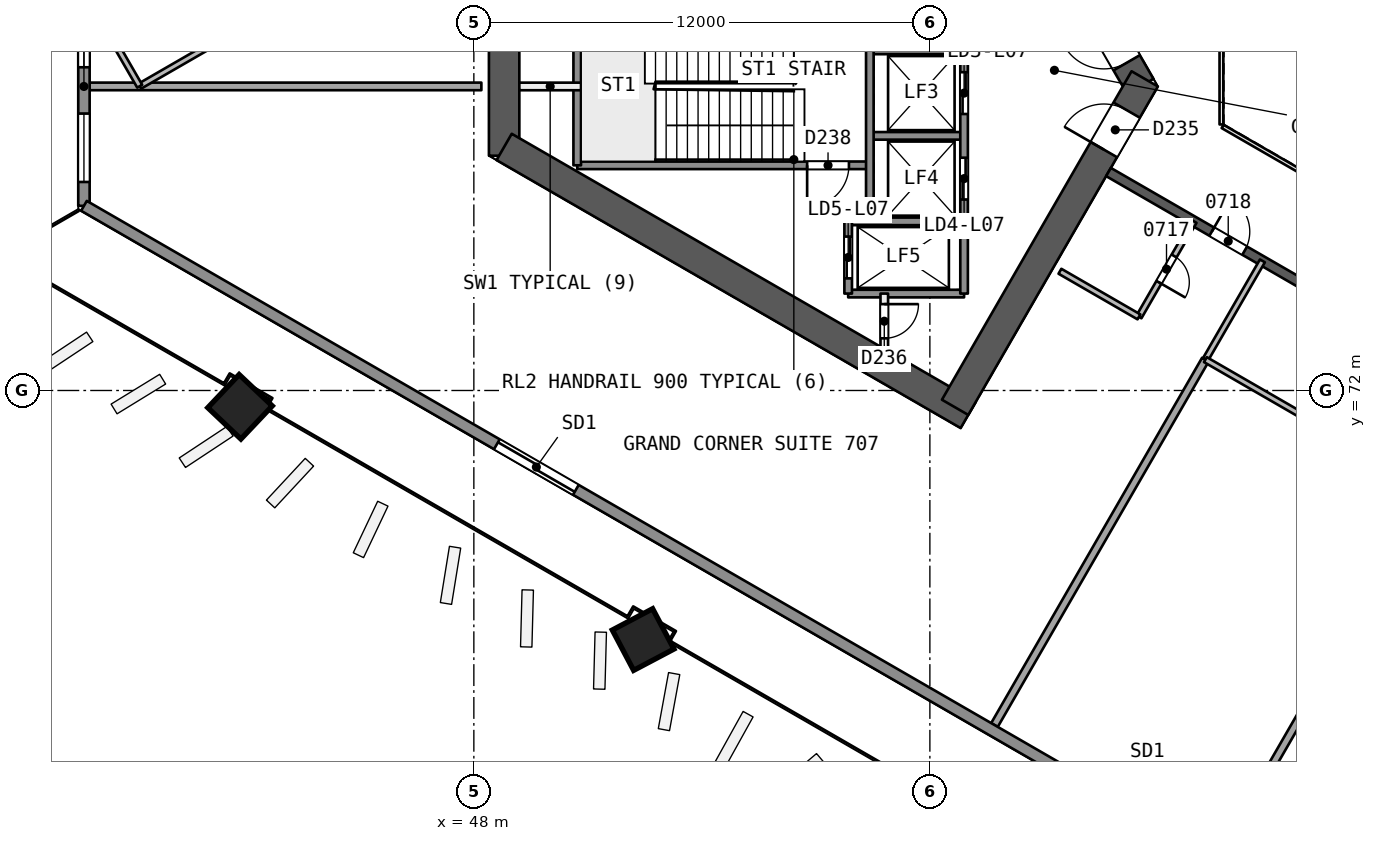
"""IFC4 building model, lengths in metres.
Left out: names, types, materials, properties, quantities, classifications, styles, units other than length and angle.
Written with IfcOpenShell. Run it as: python <this file> out.ifc"""

import sys

from ifc_helpers import new_model, si_unit, direction, frame, frame_2d, origin, origin_2d, place, context, subcontext, project, spatial, rectangle, extrude, element, fill, save


model = new_model("IFC4")
c1 = context("Model", 3, precision=1e-05, world=origin(), true_north=direction((0.0, 1.0)))
c2 = subcontext(c1, "Body", "Model", "MODEL_VIEW")
j1 = project(units=[si_unit("LENGTHUNIT", "METRE"), si_unit("PLANEANGLEUNIT", "RADIAN")], contexts=[c1])
p1 = place(None, origin())
s1 = spatial("IfcSite", under=j1, at=p1, CompositionType="ELEMENT")
p2 = place(p1, origin())
s2 = spatial("IfcBuilding", under=s1, at=p2, CompositionType="ELEMENT")
p3 = place(p2, frame((0.0, 0.0, 37.4)))
s3 = spatial("IfcBuildingStorey", under=s2, at=p3, CompositionType="ELEMENT", Elevation=37.4)
p4 = place(p3, frame((65.538, 80.0, 0.0), z_axis=(0.0, 0.0, 1.0), x_axis=(-0.49999662545, 0.866027352073, 0.0)))
e1 = element("IfcWall", 1, at=p4, inside=s3, PredefinedType="SHEAR", context=c2, shape_type="SweptSolid", body=[
    extrude(rectangle(XDim=10.149, YDim=0.8, at=frame_2d((5.074, 0.0))), origin(), (0.0, 0.0, 1.0), 3.7),
])
p5 = place(p4, frame((0.719, 0.0, 0.0)))
e2 = element("IfcOpeningElement", 2, at=p5, cuts=e1, PredefinedType="OPENING", context=c2, shape_type="SweptSolid", body=[
    extrude(rectangle(XDim=1.2, YDim=2.1, at=frame_2d((0.6, 1.05))), frame((0.0, 0.411, 0.0), z_axis=(0.0, -1.0, 0.0), x_axis=(1.0, 0.0, 0.0)), (0.0, 0.0, 1.0), 0.821),
])
p6 = place(p3, frame((48.797, 81.592, 0.0), z_axis=(0.0, 0.0, 1.0), x_axis=(0.0, -1.0, 0.0)))
e3 = element("IfcWall", 3, at=p6, inside=s3, PredefinedType="SHEAR", context=c2, shape_type="SweptSolid", body=[
    extrude(rectangle(XDim=3.415, YDim=0.8, at=frame_2d((1.707, 0.0))), origin(), (0.0, 0.0, 1.0), 3.7),
])
p7 = place(p3, frame((48.797, 78.408, 0.0), z_axis=(0.0, 0.0, 1.0), x_axis=(0.866032504327, -0.499987701298, 0.0)))
e4 = element("IfcWall", 4, at=p7, inside=s3, PredefinedType="SHEAR", context=c2, shape_type="SweptSolid", body=[
    extrude(rectangle(XDim=14.102, YDim=0.8, at=frame_2d((7.051, 0.0))), origin(), (0.0, 0.0, 1.0), 3.7),
])
p8 = place(p3, frame((60.664, 71.557, 0.0), z_axis=(0.0, 0.0, 1.0), x_axis=(0.50000409368, 0.866023040284, 0.0)))
e5 = element("IfcWall", 5, at=p8, inside=s3, PredefinedType="SHEAR", context=c2, shape_type="SweptSolid", body=[
    extrude(rectangle(XDim=9.98, YDim=0.8, at=frame_2d((4.99, 0.0))), origin(), (0.0, 0.0, 1.0), 3.7),
])
p9 = place(p8, frame((7.83, 0.0, 0.0)))
e6 = element("IfcOpeningElement", 6, at=p9, cuts=e5, PredefinedType="OPENING", context=c2, shape_type="SweptSolid", body=[
    extrude(rectangle(XDim=1.2, YDim=2.1, at=frame_2d((0.6, 1.05))), frame((0.0, 0.411, 0.0), z_axis=(0.0, -1.0, 0.0), x_axis=(1.0, 0.0, 0.0)), (0.0, 0.0, 1.0), 0.821),
])
p10 = place(p3, frame((64.7, 77.748, 0.0), z_axis=(0.0, 0.0, 1.0), x_axis=(0.866026492143, -0.499998114903, 0.0)))
e7 = element("IfcWall", 7, at=p10, inside=s3, PredefinedType="SHEAR", context=c2, shape_type="SweptSolid", body=[
    extrude(rectangle(XDim=15.588, YDim=0.25, at=frame_2d((7.794, 0.0))), origin(), (0.0, 0.0, 1.0), 3.2),
])
p11 = place(p10, frame((3.138, 0.0, 0.0)))
e8 = element("IfcOpeningElement", 8, at=p11, cuts=e7, PredefinedType="OPENING", context=c2, shape_type="SweptSolid", body=[
    extrude(rectangle(XDim=1.0, YDim=2.1, at=frame_2d((0.5, 1.05))), frame((0.0, 0.135, 0.0), z_axis=(0.0, -1.0, 0.0), x_axis=(1.0, 0.0, 0.0)), (0.0, 0.0, 1.0), 0.271),
])
p12 = place(p10, frame((9.006, 0.0, 0.0)))
e9 = element("IfcOpeningElement", 9, at=p12, cuts=e7, PredefinedType="OPENING", context=c2, shape_type="SweptSolid", body=[
    extrude(rectangle(XDim=1.1, YDim=2.1, at=frame_2d((0.55, 1.05))), frame((0.0, 0.135, 0.0), z_axis=(0.0, -1.0, 0.0), x_axis=(1.0, 0.0, 0.0)), (0.0, 0.0, 1.0), 0.271),
])
p13 = place(p10, frame((11.762, 0.0, 0.0)))
e10 = element("IfcOpeningElement", 10, at=p13, cuts=e7, PredefinedType="OPENING", context=c2, shape_type="SweptSolid", body=[
    extrude(rectangle(XDim=1.0, YDim=2.1, at=frame_2d((0.5, 1.05))), frame((0.0, 0.135, 0.0), z_axis=(0.0, -1.0, 0.0), x_axis=(1.0, 0.0, 0.0)), (0.0, 0.0, 1.0), 0.271),
])
p14 = place(p3, frame((41.813, 71.562, 0.0), z_axis=(0.028557219273, 0.006859008786, 0.999568626571), x_axis=(-0.86641042505, 0.498876758723, 0.021329673472)))
e11 = element("IfcColumn", 11, at=p14, inside=s3, PredefinedType="COLUMN", context=c2, shape_type="SweptSolid", body=[
    extrude(rectangle(XDim=1.2, YDim=1.2, at=origin_2d()), origin(), (0.0, 0.0, 1.0), 3.702),
])
p15 = place(p3, frame((52.431, 65.432, 0.0), z_axis=(0.019327242333, 0.012137244332, 0.999739538582), x_axis=(-0.865690923328, 0.500465374709, 0.010659924227)))
e12 = element("IfcColumn", 12, at=p15, inside=s3, PredefinedType="COLUMN", context=c2, shape_type="SweptSolid", body=[
    extrude(rectangle(XDim=1.2, YDim=1.2, at=origin_2d()), origin(), (0.0, 0.0, 1.0), 3.701),
])
p16 = place(p3, frame((41.459, 81.306, 0.0), z_axis=(0.0, 0.0, 1.0), x_axis=(-0.866021400173, -0.500006934395, 0.0)))
e13 = element("IfcWall", 13, at=p16, inside=s3, PredefinedType="PARTITIONING", context=c2, shape_type="SweptSolid", body=[
    extrude(rectangle(XDim=2.6, YDim=0.15, at=frame_2d((1.3, 0.0))), origin(), (0.0, 0.0, 1.0), 3.2),
])
p17 = place(p3, frame((39.208, 80.006, 0.0), z_axis=(0.0, 0.0, 1.0), x_axis=(-0.499992239852, 0.866029884062, 0.0)))
e14 = element("IfcWall", 14, at=p17, inside=s3, PredefinedType="PARTITIONING", context=c2, shape_type="SweptSolid", body=[
    extrude(rectangle(XDim=2.637, YDim=0.15, at=frame_2d((1.319, 0.0))), origin(), (0.0, 0.0, 1.0), 3.2),
])
p18 = place(p3, frame((37.889, 80.001, 0.0), z_axis=(0.0, 0.0, 1.0), x_axis=(1.0, 0.0, 0.0)))
e15 = element("IfcWall", 15, at=p18, inside=s3, PredefinedType="PARTITIONING", context=c2, shape_type="SweptSolid", body=[
    extrude(rectangle(XDim=10.309, YDim=0.2, at=frame_2d((5.155, 0.0))), origin(), (0.0, 0.0, 1.0), 3.2),
])
p19 = place(p3, frame((66.952, 76.448, 0.0), z_axis=(0.0, 0.0, 1.0), x_axis=(-0.499987231761, -0.866032775405, 0.0)))
e16 = element("IfcWall", 16, at=p19, inside=s3, PredefinedType="PARTITIONING", context=c2, shape_type="SweptSolid", body=[
    extrude(rectangle(XDim=2.9, YDim=0.15, at=frame_2d((1.45, 0.0))), origin(), (0.0, 0.0, 1.0), 3.2),
])
p20 = place(p19, frame((1.05, 0.0, 0.0)))
e17 = element("IfcOpeningElement", 17, at=p20, cuts=e16, PredefinedType="OPENING", context=c2, shape_type="SweptSolid", body=[
    extrude(rectangle(XDim=0.8, YDim=2.1, at=frame_2d((0.4, 1.05))), frame((0.0, 0.085, 0.0), z_axis=(0.0, -1.0, 0.0), x_axis=(1.0, 0.0, 0.0)), (0.0, 0.0, 1.0), 0.171),
])
p21 = place(p3, frame((65.502, 73.937, 0.0), z_axis=(0.0, 0.0, 1.0), x_axis=(-0.865994240961, 0.500053971709, 0.0)))
e18 = element("IfcWall", 18, at=p21, inside=s3, PredefinedType="PARTITIONING", context=c2, shape_type="SweptSolid", body=[
    extrude(rectangle(XDim=2.401, YDim=0.15, at=frame_2d((1.201, 0.0))), origin(), (0.0, 0.0, 1.0), 3.2),
])
p22 = place(p3, frame((61.699, 63.198, 0.0), z_axis=(0.0, 0.0, 1.0), x_axis=(0.499999115929, 0.866025914202, 0.0)))
e19 = element("IfcWall", 19, at=p22, inside=s3, PredefinedType="PARTITIONING", context=c2, shape_type="SweptSolid", body=[
    extrude(rectangle(XDim=11.102, YDim=0.2, at=frame_2d((5.551, 0.0))), origin(), (0.0, 0.0, 1.0), 3.2),
])
p23 = place(p3, frame((67.25, 72.812, 0.0), z_axis=(0.0, 0.0, 1.0), x_axis=(0.499990139034, 0.866031096941, 0.0)))
e20 = element("IfcWall", 20, at=p23, inside=s3, PredefinedType="PARTITIONING", context=c2, shape_type="SweptSolid", body=[
    extrude(rectangle(XDim=3.0, YDim=0.15, at=frame_2d((1.5, 0.0))), origin(), (0.0, 0.0, 1.0), 3.2),
])
p24 = place(p3, frame((69.761, 71.362, 0.0), z_axis=(0.0, 0.0, 1.0), x_axis=(-0.866032775405, 0.499987231761, 0.0)))
e21 = element("IfcWall", 21, at=p24, inside=s3, PredefinedType="PARTITIONING", context=c2, shape_type="SweptSolid", body=[
    extrude(rectangle(XDim=2.9, YDim=0.15, at=frame_2d((1.45, 0.0))), origin(), (0.0, 0.0, 1.0), 3.2),
])
p25 = place(p3, frame((67.639, 59.768, 0.0), z_axis=(0.0, 0.0, 1.0), x_axis=(0.499997206141, 0.866027016814, 0.0)))
e22 = element("IfcWall", 22, at=p25, inside=s3, PredefinedType="PARTITIONING", context=c2, shape_type="SweptSolid", body=[
    extrude(rectangle(XDim=14.102, YDim=0.2, at=frame_2d((7.051, 0.0))), origin(), (0.0, 0.0, 1.0), 3.2),
])
p26 = place(p3, frame((37.74, 76.859, 0.0), z_axis=(0.0, 0.0, 1.0), x_axis=(0.0, 1.0, 0.0)))
e23 = element("IfcWall", 23, at=p26, inside=s3, PredefinedType="SOLIDWALL", context=c2, shape_type="SweptSolid", body=[
    extrude(rectangle(XDim=6.283, YDim=0.3, at=frame_2d((3.141, 0.0))), origin(), (0.0, 0.0, 1.0), 3.2),
])
p27 = place(p26, frame((3.646, 0.0, 0.9)))
e24 = element("IfcOpeningElement", 24, at=p27, cuts=e23, PredefinedType="OPENING", context=c2, shape_type="SweptSolid", body=[
    extrude(rectangle(XDim=1.8, YDim=1.5, at=frame_2d((0.9, 0.75))), frame((0.0, 0.161, 0.0), z_axis=(0.0, -1.0, 0.0), x_axis=(1.0, 0.0, 0.0)), (0.0, 0.0, 1.0), 0.321),
])
p28 = place(p26, frame((0.628, 0.0, 0.9)))
e25 = element("IfcOpeningElement", 25, at=p28, cuts=e23, PredefinedType="OPENING", context=c2, shape_type="SweptSolid", body=[
    extrude(rectangle(XDim=1.8, YDim=1.5, at=frame_2d((0.9, 0.75))), frame((0.0, 0.161, 0.0), z_axis=(0.0, -1.0, 0.0), x_axis=(1.0, 0.0, 0.0)), (0.0, 0.0, 1.0), 0.321),
])
p29 = place(p3, frame((90.91, 46.161, 0.0), z_axis=(0.0, 0.0, 1.0), x_axis=(-0.866026524777, 0.499998058379, 0.0)))
e26 = element("IfcWall", 26, at=p29, inside=s3, PredefinedType="SOLIDWALL", context=c2, shape_type="SweptSolid", body=[
    extrude(rectangle(XDim=61.395, YDim=0.3, at=frame_2d((30.698, 0.0))), origin(), (0.0, 0.0, 1.0), 3.2),
])
p30 = place(p29, frame((29.186, 0.0, 0.0)))
e27 = element("IfcOpeningElement", 27, at=p30, cuts=e26, PredefinedType="OPENING", context=c2, shape_type="SweptSolid", body=[
    extrude(rectangle(XDim=2.4, YDim=2.4, at=frame_2d((1.2, 1.2))), frame((0.0, 0.161, 0.0), z_axis=(0.0, -1.0, 0.0), x_axis=(1.0, 0.0, 0.0)), (0.0, 0.0, 1.0), 0.321),
])
p31 = place(p29, frame((46.448, 0.0, 0.0)))
e28 = element("IfcOpeningElement", 28, at=p31, cuts=e26, PredefinedType="OPENING", context=c2, shape_type="SweptSolid", body=[
    extrude(rectangle(XDim=2.4, YDim=2.4, at=frame_2d((1.2, 1.2))), frame((0.0, 0.161, 0.0), z_axis=(0.0, -1.0, 0.0), x_axis=(1.0, 0.0, 0.0)), (0.0, 0.0, 1.0), 0.321),
])
p32 = place(p29, frame((12.235, 0.0, 0.0)))
e29 = element("IfcOpeningElement", 29, at=p32, cuts=e26, PredefinedType="OPENING", context=c2, shape_type="SweptSolid", body=[
    extrude(rectangle(XDim=2.4, YDim=2.4, at=frame_2d((1.2, 1.2))), frame((0.0, 0.161, 0.0), z_axis=(0.0, -1.0, 0.0), x_axis=(1.0, 0.0, 0.0)), (0.0, 0.0, 1.0), 0.321),
])
p33 = place(p3, frame((60.9, 80.95, 0.0), z_axis=(0.0, 0.0, 1.0), x_axis=(-1.0, 0.0, 0.0)))
e30 = element("IfcWall", 30, at=p33, inside=s3, PredefinedType="SOLIDWALL", context=c2, shape_type="SweptSolid", body=[
    extrude(rectangle(XDim=2.48, YDim=0.2, at=frame_2d((1.24, 0.0))), origin(), (0.0, 0.0, 1.0), 3.2),
])
p34 = place(p3, frame((50.82, 80.0, 0.0), z_axis=(0.0, 0.0, 1.0), x_axis=(-1.0, 0.0, 0.0)))
e31 = element("IfcWall", 31, at=p34, inside=s3, PredefinedType="PARTITIONING", context=c2, shape_type="SweptSolid", body=[
    extrude(rectangle(XDim=1.623, YDim=0.2, at=frame_2d((0.812, 0.0))), origin(), (0.0, 0.0, 1.0), 3.2),
])
p35 = place(p3, frame((60.9, 78.7, 0.0), z_axis=(0.0, 0.0, 1.0), x_axis=(-1.0, 0.0, 0.0)))
e32 = element("IfcWall", 32, at=p35, inside=s3, PredefinedType="SOLIDWALL", context=c2, shape_type="SweptSolid", body=[
    extrude(rectangle(XDim=2.48, YDim=0.2, at=frame_2d((1.24, 0.0))), origin(), (0.0, 0.0, 1.0), 3.2),
])
p36 = place(p3, frame((58.42, 77.925, 0.0), z_axis=(0.0, 0.0, 1.0), x_axis=(-1.0, 0.0, 0.0)))
e33 = element("IfcWall", 33, at=p36, inside=s3, PredefinedType="SOLIDWALL", context=c2, shape_type="SweptSolid", body=[
    extrude(rectangle(XDim=7.7, YDim=0.2, at=frame_2d((3.85, 0.0))), origin(), (0.0, 0.0, 1.0), 3.2),
])
p37 = place(p36, frame((0.55, 0.0, 0.0)))
e34 = element("IfcOpeningElement", 34, at=p37, cuts=e33, PredefinedType="OPENING", context=c2, shape_type="SweptSolid", body=[
    extrude(rectangle(XDim=1.1, YDim=2.1, at=frame_2d((0.55, 1.05))), frame((0.0, 0.11, 0.0), z_axis=(0.0, -1.0, 0.0), x_axis=(1.0, 0.0, 0.0)), (0.0, 0.0, 1.0), 0.221),
])
for number, where, z_axis, x_axis in (
    (35, (60.9, 76.45, 0.0), (0.0, 0.0, 1.0), (-1.0, 0.0, 0.0)),
    (36, (60.9, 74.55, 0.0), (0.0, 0.0, 1.0), (-1.0, 0.0, 0.0)),
):
    element("IfcWall", number, at=place(p3, frame(where, z_axis=z_axis, x_axis=x_axis)), inside=s3, PredefinedType="SOLIDWALL", context=c2, shape_type="SweptSolid", body=[
        extrude(rectangle(XDim=3.05, YDim=0.2, at=frame_2d((1.525, 0.0))), origin(), (0.0, 0.0, 1.0), 3.2),
    ])
p38 = place(p3, frame((60.9, 85.45, 0.0), z_axis=(0.0, 0.0, 1.0), x_axis=(0.0, -1.0, 0.0)))
e37 = element("IfcWall", 37, at=p38, inside=s3, PredefinedType="SOLIDWALL", context=c2, shape_type="SweptSolid", body=[
    extrude(rectangle(XDim=10.9, YDim=0.2, at=frame_2d((5.45, 0.0))), origin(), (0.0, 0.0, 1.0), 3.2),
])
p39 = place(p38, frame((0.575, 0.0, 0.0)))
e38 = element("IfcOpeningElement", 38, at=p39, cuts=e37, PredefinedType="OPENING", context=c2, shape_type="SweptSolid", body=[
    extrude(rectangle(XDim=1.1, YDim=2.1, at=frame_2d((0.55, 1.05))), frame((0.0, 0.11, 0.0), z_axis=(0.0, -1.0, 0.0), x_axis=(1.0, 0.0, 0.0)), (0.0, 0.0, 1.0), 0.221),
])
p40 = place(p38, frame((2.825, 0.0, 0.0)))
e39 = element("IfcOpeningElement", 39, at=p40, cuts=e37, PredefinedType="OPENING", context=c2, shape_type="SweptSolid", body=[
    extrude(rectangle(XDim=1.1, YDim=2.1, at=frame_2d((0.55, 1.05))), frame((0.0, 0.11, 0.0), z_axis=(0.0, -1.0, 0.0), x_axis=(1.0, 0.0, 0.0)), (0.0, 0.0, 1.0), 0.221),
])
p41 = place(p38, frame((5.075, 0.0, 0.0)))
e40 = element("IfcOpeningElement", 40, at=p41, cuts=e37, PredefinedType="OPENING", context=c2, shape_type="SweptSolid", body=[
    extrude(rectangle(XDim=1.1, YDim=2.1, at=frame_2d((0.55, 1.05))), frame((0.0, 0.11, 0.0), z_axis=(0.0, -1.0, 0.0), x_axis=(1.0, 0.0, 0.0)), (0.0, 0.0, 1.0), 0.221),
])
p42 = place(p38, frame((7.325, 0.0, 0.0)))
e41 = element("IfcOpeningElement", 41, at=p42, cuts=e37, PredefinedType="OPENING", context=c2, shape_type="SweptSolid", body=[
    extrude(rectangle(XDim=1.1, YDim=2.1, at=frame_2d((0.55, 1.05))), frame((0.0, 0.11, 0.0), z_axis=(0.0, -1.0, 0.0), x_axis=(1.0, 0.0, 0.0)), (0.0, 0.0, 1.0), 0.221),
])
p43 = place(p3, frame((58.8, 74.55, 0.0), z_axis=(0.0, 0.0, 1.0), x_axis=(0.0, -1.0, 0.0)))
e42 = element("IfcWall", 42, at=p43, inside=s3, PredefinedType="PARTITIONING", context=c2, shape_type="SweptSolid", body=[
    extrude(rectangle(XDim=1.455, YDim=0.2, at=frame_2d((0.728, 0.0))), origin(), (0.0, 0.0, 1.0), 3.2),
])
p44 = place(p43, frame((0.278, 0.0, 0.0)))
e43 = element("IfcOpeningElement", 43, at=p44, cuts=e42, PredefinedType="OPENING", context=c2, shape_type="SweptSolid", body=[
    extrude(rectangle(XDim=0.9, YDim=2.1, at=frame_2d((0.45, 1.05))), frame((0.0, 0.11, 0.0), z_axis=(0.0, -1.0, 0.0), x_axis=(1.0, 0.0, 0.0)), (0.0, 0.0, 1.0), 0.221),
])
p45 = place(p3, frame((58.42, 85.45, 0.0), z_axis=(0.0, 0.0, 1.0), x_axis=(0.0, -1.0, 0.0)))
e44 = element("IfcWall", 44, at=p45, inside=s3, PredefinedType="SOLIDWALL", context=c2, shape_type="SweptSolid", body=[
    extrude(rectangle(XDim=9.0, YDim=0.2, at=frame_2d((4.5, 0.0))), origin(), (0.0, 0.0, 1.0), 3.2),
])
p46 = place(p3, frame((57.85, 76.45, 0.0), z_axis=(0.0, 0.0, 1.0), x_axis=(0.0, -1.0, 0.0)))
e45 = element("IfcWall", 45, at=p46, inside=s3, PredefinedType="SOLIDWALL", context=c2, shape_type="SweptSolid", body=[
    extrude(rectangle(XDim=1.9, YDim=0.2, at=frame_2d((0.95, 0.0))), origin(), (0.0, 0.0, 1.0), 3.2),
])
p47 = place(p46, frame((0.4, 0.0, 0.0)))
e46 = element("IfcOpeningElement", 46, at=p47, cuts=e45, PredefinedType="OPENING", context=c2, shape_type="SweptSolid", body=[
    extrude(rectangle(XDim=1.1, YDim=2.1, at=frame_2d((0.55, 1.05))), frame((0.0, 0.11, 0.0), z_axis=(0.0, -1.0, 0.0), x_axis=(1.0, 0.0, 0.0)), (0.0, 0.0, 1.0), 0.221),
])
p48 = place(p3, frame((50.72, 82.075, 0.0), z_axis=(0.0, 0.0, 1.0), x_axis=(0.0, -1.0, 0.0)))
e47 = element("IfcWall", 47, at=p48, inside=s3, PredefinedType="SOLIDWALL", context=c2, shape_type="SweptSolid", body=[
    extrude(rectangle(XDim=4.15, YDim=0.2, at=frame_2d((2.075, 0.0))), origin(), (0.0, 0.0, 1.0), 3.2),
])
p49 = place(p3, frame((67.672, 81.0, 0.0), z_axis=(0.0, 0.0, 1.0), x_axis=(0.0, -1.0, 0.0)))
e48 = element("IfcWall", 48, at=p49, inside=s3, PredefinedType="PARTITIONING", context=c2, shape_type="SweptSolid", body=[
    extrude(rectangle(XDim=2.0, YDim=0.1, at=frame_2d((1.0, 0.0))), origin(), (0.0, 0.0, 1.0), 3.2),
])
p50 = place(p3, frame((67.702, 78.948, 0.0), z_axis=(0.0, 0.0, 1.0), x_axis=(0.866026658274, -0.499997827154, 0.0)))
e49 = element("IfcWall", 49, at=p50, inside=s3, PredefinedType="PARTITIONING", context=c2, shape_type="SweptSolid", body=[
    extrude(rectangle(XDim=11.588, YDim=0.1, at=frame_2d((5.794, 0.0))), origin(), (0.0, 0.0, 1.0), 3.2),
])
p51 = place(p20, origin())
e50 = element("IfcDoor", 50, at=p51, inside=s3, OperationType="SINGLE_SWING_RIGHT", PredefinedType="NOTDEFINED", context=c2, shape_type="SweptSolid", body=[
    extrude(rectangle(XDim=0.8, YDim=2.1, at=frame_2d((0.4, 1.05))), frame((0.0, 0.025, 0.0), z_axis=(0.0, -1.0, 0.0), x_axis=(1.0, 0.0, 0.0)), (0.0, 0.0, 1.0), 0.05),
])
fill(e17, e50)
p52 = place(p11, origin())
e51 = element("IfcDoor", 51, at=p52, inside=s3, OperationType="SINGLE_SWING_LEFT", PredefinedType="NOTDEFINED", context=c2, shape_type="SweptSolid", body=[
    extrude(rectangle(XDim=1.0, YDim=2.1, at=frame_2d((0.5, 1.05))), frame((0.0, 0.025, 0.0), z_axis=(0.0, -1.0, 0.0), x_axis=(1.0, 0.0, 0.0)), (0.0, 0.0, 1.0), 0.05),
])
fill(e8, e51)
p53 = place(p27, origin())
e52 = element("IfcWindow", 52, at=p53, inside=s3, PartitioningType="SINGLE_PANEL", PredefinedType="WINDOW", context=c2, shape_type="SweptSolid", body=[
    extrude(rectangle(XDim=1.8, YDim=1.5, at=frame_2d((0.9, 0.75))), frame((0.0, 0.03, 0.0), z_axis=(0.0, -1.0, 0.0), x_axis=(1.0, 0.0, 0.0)), (0.0, 0.0, 1.0), 0.06),
])
fill(e24, e52)
p54 = place(p28, origin())
e53 = element("IfcWindow", 53, at=p54, inside=s3, PartitioningType="SINGLE_PANEL", PredefinedType="WINDOW", context=c2, shape_type="SweptSolid", body=[
    extrude(rectangle(XDim=1.8, YDim=1.5, at=frame_2d((0.9, 0.75))), frame((0.0, 0.03, 0.0), z_axis=(0.0, -1.0, 0.0), x_axis=(1.0, 0.0, 0.0)), (0.0, 0.0, 1.0), 0.06),
])
fill(e25, e53)
p55 = place(p31, origin())
e54 = element("IfcDoor", 54, at=p55, inside=s3, OperationType="SLIDING_TO_RIGHT", PredefinedType="NOTDEFINED", context=c2, shape_type="SweptSolid", body=[
    extrude(rectangle(XDim=2.4, YDim=2.4, at=frame_2d((1.2, 1.2))), frame((0.0, 0.025, 0.0), z_axis=(0.0, -1.0, 0.0), x_axis=(1.0, 0.0, 0.0)), (0.0, 0.0, 1.0), 0.05),
])
fill(e28, e54)
p56 = place(p5, origin())
e55 = element("IfcDoor", 55, at=p56, inside=s3, OperationType="SINGLE_SWING_RIGHT", PredefinedType="NOTDEFINED", context=c2, shape_type="SweptSolid", body=[
    extrude(rectangle(XDim=1.2, YDim=2.1, at=frame_2d((0.6, 1.05))), frame((0.0, 0.025, 0.0), z_axis=(0.0, -1.0, 0.0), x_axis=(1.0, 0.0, 0.0)), (0.0, 0.0, 1.0), 0.05),
])
fill(e2, e55)
p57 = place(p9, origin())
e56 = element("IfcDoor", 56, at=p57, inside=s3, OperationType="SINGLE_SWING_LEFT", PredefinedType="NOTDEFINED", context=c2, shape_type="SweptSolid", body=[
    extrude(rectangle(XDim=1.2, YDim=2.1, at=frame_2d((0.6, 1.05))), frame((0.0, 0.025, 0.0), z_axis=(0.0, -1.0, 0.0), x_axis=(1.0, 0.0, 0.0)), (0.0, 0.0, 1.0), 0.05),
])
fill(e6, e56)
p58 = place(p41, origin())
e57 = element("IfcDoor", 57, at=p58, inside=s3, OperationType="SLIDING_TO_RIGHT", PredefinedType="NOTDEFINED", context=c2, shape_type="SweptSolid", body=[
    extrude(rectangle(XDim=1.1, YDim=2.1, at=frame_2d((0.55, 1.05))), frame((0.0, 0.025, 0.0), z_axis=(0.0, -1.0, 0.0), x_axis=(1.0, 0.0, 0.0)), (0.0, 0.0, 1.0), 0.05),
])
fill(e40, e57)
p59 = place(p42, origin())
e58 = element("IfcDoor", 58, at=p59, inside=s3, OperationType="SLIDING_TO_LEFT", PredefinedType="NOTDEFINED", context=c2, shape_type="SweptSolid", body=[
    extrude(rectangle(XDim=1.1, YDim=2.1, at=frame_2d((0.55, 1.05))), frame((0.0, 0.025, 0.0), z_axis=(0.0, -1.0, 0.0), x_axis=(1.0, 0.0, 0.0)), (0.0, 0.0, 1.0), 0.05),
])
fill(e41, e58)
p60 = place(p47, origin())
e59 = element("IfcDoor", 59, at=p60, inside=s3, OperationType="SLIDING_TO_RIGHT", PredefinedType="NOTDEFINED", context=c2, shape_type="SweptSolid", body=[
    extrude(rectangle(XDim=1.1, YDim=2.1, at=frame_2d((0.55, 1.05))), frame((0.0, 0.025, 0.0), z_axis=(0.0, -1.0, 0.0), x_axis=(1.0, 0.0, 0.0)), (0.0, 0.0, 1.0), 0.05),
])
fill(e46, e59)
p61 = place(p44, origin())
e60 = element("IfcDoor", 60, at=p61, inside=s3, OperationType="SINGLE_SWING_LEFT", PredefinedType="NOTDEFINED", context=c2, shape_type="SweptSolid", body=[
    extrude(rectangle(XDim=0.9, YDim=2.1, at=frame_2d((0.45, 1.05))), frame((0.0, 0.025, 0.0), z_axis=(0.0, -1.0, 0.0), x_axis=(1.0, 0.0, 0.0)), (0.0, 0.0, 1.0), 0.05),
])
fill(e43, e60)
p62 = place(p37, origin())
e61 = element("IfcDoor", 61, at=p62, inside=s3, OperationType="SINGLE_SWING_RIGHT", PredefinedType="NOTDEFINED", context=c2, shape_type="SweptSolid", body=[
    extrude(rectangle(XDim=1.1, YDim=2.1, at=frame_2d((0.55, 1.05))), frame((0.0, 0.025, 0.0), z_axis=(0.0, -1.0, 0.0), x_axis=(1.0, 0.0, 0.0)), (0.0, 0.0, 1.0), 0.05),
])
fill(e34, e61)
save(model, sys.argv[1])
